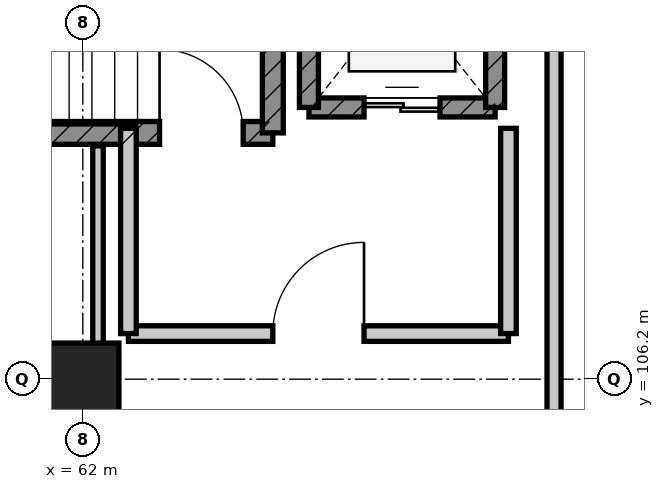
"""IFC4 building model, lengths in metres.
Left out: names, types, materials, properties, quantities, classifications, styles, units other than length and angle.
Written with IfcOpenShell. Run it as: python <this file> out.ifc"""

import sys

from ifc_helpers import new_model, si_unit, direction, frame, frame_2d, origin, origin_2d, place, context, subcontext, project, spatial, rectangle, extrude, element, fill, save


model = new_model("IFC4")
c1 = context("Model", 3, precision=1e-05, world=origin(), true_north=direction((0.0, 1.0)))
c2 = subcontext(c1, "Body", "Model", "MODEL_VIEW")
j1 = project(units=[si_unit("LENGTHUNIT", "METRE"), si_unit("PLANEANGLEUNIT", "RADIAN")], contexts=[c1])
p1 = place(None, origin())
s1 = spatial("IfcSite", under=j1, at=p1, CompositionType="ELEMENT")
p2 = place(p1, origin())
s2 = spatial("IfcBuilding", under=s1, at=p2, CompositionType="ELEMENT")
p3 = place(p2, frame((0.0, 0.0, -4.5)))
s3 = spatial("IfcBuildingStorey", under=s2, at=p3, CompositionType="ELEMENT", Elevation=-4.5)
p4 = place(p3, frame((62.0, 106.2, 0.0), z_axis=(0.0, 0.0, 1.0), x_axis=(1.0, 0.0, 0.0)))
e1 = element("IfcColumn", 1, at=p4, inside=s3, PredefinedType="COLUMN", context=c2, shape_type="SweptSolid", body=[
    extrude(rectangle(XDim=0.95, YDim=0.95, at=origin_2d()), origin(), (0.0, 0.0, 1.0), 4.5),
])
p5 = place(p3, frame((56.1, 109.44, 0.0), z_axis=(0.0, 0.0, 1.0), x_axis=(1.0, 0.0, 0.0)))
e2 = element("IfcWall", 2, at=p5, inside=s3, PredefinedType="SHEAR", context=c2, shape_type="SweptSolid", body=[
    extrude(rectangle(XDim=8.4, YDim=0.3, at=frame_2d((4.2, 0.0))), origin(), (0.0, 0.0, 1.0), 4.2),
])
p6 = place(p5, frame((6.91, 0.0, 0.0)))
e3 = element("IfcOpeningElement", 3, at=p6, cuts=e2, PredefinedType="OPENING", context=c2, shape_type="SweptSolid", body=[
    extrude(rectangle(XDim=1.1, YDim=2.1, at=frame_2d((0.55, 1.05))), frame((0.0, 0.16, 0.0), z_axis=(0.0, -1.0, 0.0), x_axis=(1.0, 0.0, 0.0)), (0.0, 0.0, 1.0), 0.32),
])
p7 = place(p3, frame((64.5, 109.44, 0.0), z_axis=(0.0, 0.0, 1.0), x_axis=(0.0, 1.0, 0.0)))
e4 = element("IfcWall", 4, at=p7, inside=s3, PredefinedType="SHEAR", context=c2, shape_type="SweptSolid", body=[
    extrude(rectangle(XDim=3.56, YDim=0.275, at=frame_2d((1.78, 0.0))), origin(), (0.0, 0.0, 1.0), 4.2),
])
p8 = place(p3, frame((64.975, 109.775, 0.0), z_axis=(0.0, 0.0, 1.0), x_axis=(1.0, 0.0, 0.0)))
e5 = element("IfcWall", 5, at=p8, inside=s3, PredefinedType="SHEAR", context=c2, shape_type="SweptSolid", body=[
    extrude(rectangle(XDim=2.45, YDim=0.25, at=frame_2d((1.225, 0.0))), origin(), (0.0, 0.0, 1.0), 4.2),
])
p9 = place(p8, frame((0.725, 0.0, 0.0)))
e6 = element("IfcOpeningElement", 6, at=p9, cuts=e5, PredefinedType="OPENING", context=c2, shape_type="SweptSolid", body=[
    extrude(rectangle(XDim=1.0, YDim=2.15, at=frame_2d((0.5, 1.075))), frame((0.0, 0.135, 0.0), z_axis=(0.0, -1.0, 0.0), x_axis=(1.0, 0.0, 0.0)), (0.0, 0.0, 1.0), 0.27),
])
for number, where, z_axis, x_axis in (
    (7, (67.425, 109.775, 0.0), (0.0, 0.0, 1.0), (0.0, 1.0, 0.0)),
    (8, (64.975, 112.825, 0.0), (0.0, 0.0, 1.0), (0.0, -1.0, 0.0)),
):
    element("IfcWall", number, at=place(p3, frame(where, z_axis=z_axis, x_axis=x_axis)), inside=s3, PredefinedType="SHEAR", context=c2, shape_type="SweptSolid", body=[
        extrude(rectangle(XDim=3.05, YDim=0.25, at=frame_2d((1.525, 0.0))), origin(), (0.0, 0.0, 1.0), 4.2),
    ])
p10 = place(p3, frame((62.6, 106.8, 0.0), z_axis=(0.0, 0.0, 1.0), x_axis=(1.0, 0.0, 0.0)))
e9 = element("IfcWall", 9, at=p10, inside=s3, PredefinedType="PARTITIONING", context=c2, shape_type="SweptSolid", body=[
    extrude(rectangle(XDim=5.0, YDim=0.205, at=frame_2d((2.5, 0.0))), origin(), (0.0, 0.0, 1.0), 4.2),
])
p11 = place(p10, frame((1.9, 0.0, 0.0)))
e10 = element("IfcOpeningElement", 10, at=p11, cuts=e9, PredefinedType="OPENING", context=c2, shape_type="SweptSolid", body=[
    extrude(rectangle(XDim=1.2, YDim=2.1, at=frame_2d((0.6, 1.05))), frame((0.0, 0.113, 0.0), z_axis=(0.0, -1.0, 0.0), x_axis=(1.0, 0.0, 0.0)), (0.0, 0.0, 1.0), 0.225),
])
for number, where, z_axis, x_axis in (
    (11, (67.6, 106.8, 0.0), (0.0, 0.0, 1.0), (0.0, 1.0, 0.0)),
    (12, (62.6, 109.5, 0.0), (0.0, 0.0, 1.0), (0.0, -1.0, 0.0)),
):
    element("IfcWall", number, at=place(p3, frame(where, z_axis=z_axis, x_axis=x_axis)), inside=s3, PredefinedType="PARTITIONING", context=c2, shape_type="SweptSolid", body=[
        extrude(rectangle(XDim=2.7, YDim=0.205, at=frame_2d((1.35, 0.0))), origin(), (0.0, 0.0, 1.0), 4.2),
    ])
p12 = place(p3, frame((62.2, 109.27, 0.0), z_axis=(0.0, 0.0, 1.0), x_axis=(0.0, -1.0, 0.0)))
e13 = element("IfcWall", 13, at=p12, inside=s3, PredefinedType="PARTITIONING", context=c2, shape_type="SweptSolid", body=[
    extrude(rectangle(XDim=5.27, YDim=0.138, at=frame_2d((2.635, 0.0))), origin(), (0.0, 0.0, 1.0), 3.335),
])
p13 = place(p3, frame((68.2, 104.0, 0.0), z_axis=(0.0, 0.0, 1.0), x_axis=(0.0, 1.0, 0.0)))
e14 = element("IfcWall", 14, at=p13, inside=s3, PredefinedType="PARTITIONING", context=c2, shape_type="SweptSolid", body=[
    extrude(rectangle(XDim=13.0, YDim=0.185, at=frame_2d((6.5, 0.0))), origin(), (0.0, 0.0, 1.0), 3.435),
])
p14 = place(p6, origin())
e15 = element("IfcDoor", 15, at=p14, inside=s3, OperationType="SINGLE_SWING_LEFT", PredefinedType="DOOR", context=c2, shape_type="SweptSolid", body=[
    extrude(rectangle(XDim=1.1, YDim=2.1, at=frame_2d((0.55, 1.05))), frame((0.0, 0.025, 0.0), z_axis=(0.0, -1.0, 0.0), x_axis=(1.0, 0.0, 0.0)), (0.0, 0.0, 1.0), 0.05),
])
fill(e3, e15)
p15 = place(p9, origin())
e16 = element("IfcDoor", 16, at=p15, inside=s3, OperationType="DOUBLE_DOOR_SLIDING", PredefinedType="DOOR", context=c2, shape_type="SweptSolid", body=[
    extrude(rectangle(XDim=1.0, YDim=2.15, at=frame_2d((0.5, 1.075))), frame((0.0, 0.025, 0.0), z_axis=(0.0, -1.0, 0.0), x_axis=(1.0, 0.0, 0.0)), (0.0, 0.0, 1.0), 0.05),
])
fill(e6, e16)
p16 = place(p11, origin())
e17 = element("IfcDoor", 17, at=p16, inside=s3, OperationType="SINGLE_SWING_RIGHT", PredefinedType="DOOR", context=c2, shape_type="SweptSolid", body=[
    extrude(rectangle(XDim=1.2, YDim=2.1, at=frame_2d((0.6, 1.05))), frame((0.0, 0.025, 0.0), z_axis=(0.0, -1.0, 0.0), x_axis=(1.0, 0.0, 0.0)), (0.0, 0.0, 1.0), 0.05),
])
fill(e10, e17)
save(model, sys.argv[1])
